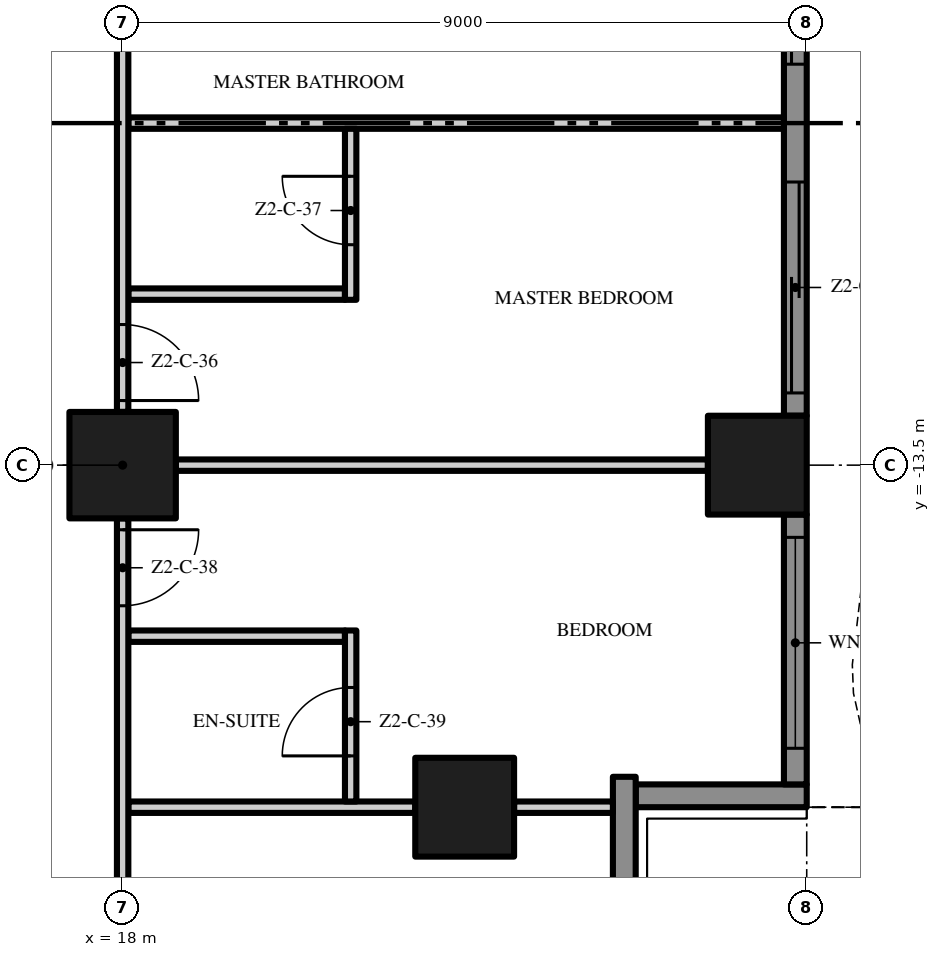
"""IFC4 building model, lengths in metres.
Left out: names, types, materials, properties, quantities, classifications, styles, units other than length and angle.
Written with IfcOpenShell. Run it as: python <this file> out.ifc"""

import sys

from ifc_helpers import new_model, si_unit, direction, frame, frame_2d, origin, origin_2d, place, context, subcontext, project, spatial, polyline, rectangle, outline, extrude, element, fill, save


model = new_model("IFC4")
c1 = context("Model", 3, precision=1e-05, world=origin(), true_north=direction((0.0, 1.0)))
c2 = subcontext(c1, "Body", "Model", "MODEL_VIEW")
j1 = project(units=[si_unit("LENGTHUNIT", "METRE"), si_unit("PLANEANGLEUNIT", "RADIAN")], contexts=[c1])
p1 = place(None, origin())
s1 = spatial("IfcSite", under=j1, at=p1, CompositionType="ELEMENT")
p2 = place(p1, origin())
s2 = spatial("IfcBuilding", under=s1, at=p2, CompositionType="ELEMENT")
p3 = place(p2, frame((0.0, 0.0, 96.0)))
s3 = spatial("IfcBuildingStorey", under=s2, at=p3, CompositionType="ELEMENT", Elevation=96.0)
p4 = place(p3, frame((18.0, -13.5, 0.0), z_axis=(0.0, 0.0, 1.0), x_axis=(1.0, 0.0, 0.0)))
e1 = element("IfcColumn", 1, at=p4, inside=s3, PredefinedType="COLUMN", context=c2, shape_type="SweptSolid", body=[
    extrude(rectangle(XDim=1.4, YDim=1.4, at=origin_2d()), origin(), (0.0, 0.0, 1.0), 3.5),
])
for number, where, z_axis, x_axis in (
    (2, (26.35, -13.5, 0.0), (0.0, 0.0, 1.0), (1.0, 0.0, 0.0)),
    (3, (22.5, -18.0, 0.0), (0.0, 0.0, 1.0), (1.0, 0.0, 0.0)),
):
    element("IfcColumn", number, at=place(p3, frame(where, z_axis=z_axis, x_axis=x_axis)), inside=s3, PredefinedType="COLUMN", context=c2, shape_type="SweptSolid", body=[
        extrude(rectangle(XDim=1.3, YDim=1.3, at=origin_2d()), origin(), (0.0, 0.0, 1.0), 3.5),
    ])
p5 = place(p3, frame((24.6, -17.6, 0.0), z_axis=(0.0, 0.0, 1.0), x_axis=(0.0, -1.0, 0.0)))
e4 = element("IfcWall", 4, at=p5, inside=s3, PredefinedType="SOLIDWALL", context=c2, shape_type="SweptSolid", body=[
    extrude(rectangle(XDim=2.35, YDim=0.3, at=frame_2d((1.175, 0.0))), origin(), (0.0, 0.0, 1.0), 3.5),
])
p6 = place(p3, frame((27.0, -17.85, 0.0), z_axis=(0.0, 0.0, 1.0), x_axis=(-1.0, 0.0, 0.0)))
e5 = element("IfcWall", 5, at=p6, inside=s3, PredefinedType="SOLIDWALL", context=c2, shape_type="SweptSolid", body=[
    extrude(rectangle(XDim=2.25, YDim=0.3, at=frame_2d((1.125, 0.0))), origin(), (0.0, 0.0, 1.0), 3.5),
])
p7 = place(p3, frame((26.85, -14.15, 0.0), z_axis=(0.0, 0.0, 1.0), x_axis=(0.0, -1.0, 0.0)))
e6 = element("IfcWall", 6, at=p7, inside=s3, PredefinedType="SOLIDWALL", context=c2, shape_type="SweptSolid", body=[
    extrude(rectangle(XDim=3.55, YDim=0.3, at=frame_2d((1.775, 0.0))), origin(), (0.0, 0.0, 1.0), 3.5),
])
p8 = place(p7, frame((0.3, 0.0, 0.45)))
e7 = element("IfcOpeningElement", 7, at=p8, cuts=e6, PredefinedType="OPENING", context=c2, shape_type="SweptSolid", body=[
    extrude(rectangle(XDim=2.775, YDim=2.65, at=frame_2d((1.387, 1.325))), frame((0.0, 0.16, 0.0), z_axis=(0.0, -1.0, 0.0), x_axis=(1.0, 0.0, 0.0)), (0.0, 0.0, 1.0), 0.32),
])
p9 = place(p3, frame((26.85, -5.15, 0.0), z_axis=(0.0, 0.0, 1.0), x_axis=(0.0, -1.0, 0.0)))
e8 = element("IfcWall", 8, at=p9, inside=s3, PredefinedType="SOLIDWALL", context=c2, shape_type="SweptSolid", body=[
    extrude(rectangle(XDim=7.7, YDim=0.3, at=frame_2d((3.85, 0.0))), origin(), (0.0, 0.0, 1.0), 3.5),
])
p10 = place(p9, frame((4.625, 0.0, 0.0)))
e9 = element("IfcOpeningElement", 9, at=p10, cuts=e8, PredefinedType="OPENING", context=c2, shape_type="SweptSolid", body=[
    extrude(rectangle(XDim=2.775, YDim=2.4, at=frame_2d((1.387, 1.2))), frame((0.0, 0.16, 0.0), z_axis=(0.0, -1.0, 0.0), x_axis=(1.0, 0.0, 0.0)), (0.0, 0.0, 1.0), 0.32),
])
p11 = place(p9, frame((0.3, 0.0, 0.0)))
e10 = element("IfcOpeningElement", 10, at=p11, cuts=e8, PredefinedType="OPENING", context=c2, shape_type="SweptSolid", body=[
    extrude(rectangle(XDim=2.775, YDim=2.4, at=frame_2d((1.387, 1.2))), frame((0.0, 0.16, 0.0), z_axis=(0.0, -1.0, 0.0), x_axis=(1.0, 0.0, 0.0)), (0.0, 0.0, 1.0), 0.32),
])
p12 = place(p3, origin())
e11 = element("IfcWall", 11, at=p12, inside=s3, PredefinedType="USERDEFINED", context=c2, shape_type="SweptSolid", body=[
    extrude(outline(polyline([(27.951, -18.0), (27.615, -16.5), (27.6, -16.125), (27.731, -15.0), (28.255, -13.5), (28.988, -12.0), (29.649, -10.5), (29.985, -9.0), (30.0, -8.625), (29.869, -7.5), (29.345, -6.0), (28.612, -4.5), (27.951, -3.0), (27.615, -1.5), (27.6, -1.125), (27.731, 0.0), (28.255, 1.5), (28.988, 3.0), (29.649, 4.5), (29.985, 6.0), (30.0, 6.375), (29.869, 7.5), (29.345, 9.0), (28.612, 10.5), (27.951, 12.0), (27.615, 13.5), (27.6, 13.875), (27.731, 15.0), (28.255, 16.5), (28.988, 18.0), (28.763, 18.11), (28.024, 16.596), (27.486, 15.056), (27.349, 13.885), (27.366, 13.467), (27.713, 11.921), (28.385, 10.395), (29.114, 8.904), (29.624, 7.444), (29.749, 6.365), (29.736, 6.033), (29.41, 4.579), (28.761, 3.105), (28.024, 1.596), (27.486, 0.056), (27.349, -1.115), (27.366, -1.533), (27.713, -3.079), (28.385, -4.605), (29.114, -6.096), (29.624, -7.556), (29.749, -8.635), (29.736, -8.967), (29.41, -10.421), (28.761, -11.895), (28.024, -13.404), (27.486, -14.944), (27.349, -16.115), (27.366, -16.533), (27.708, -18.055), (27.951, -18.0)])), origin(), (0.0, 0.0, 1.0), 0.9),
])
p13 = place(p3, frame((18.075, -18.0, 0.0), z_axis=(0.0, 0.0, 1.0), x_axis=(1.0, 0.0, 0.0)))
e12 = element("IfcWall", 12, at=p13, inside=s3, PredefinedType="PARTITIONING", context=c2, shape_type="SweptSolid", body=[
    extrude(rectangle(XDim=3.775, YDim=0.15, at=frame_2d((1.887, 0.0))), origin(), (0.0, 0.0, 1.0), 3.5),
])
p14 = place(p3, frame((23.15, -18.0, 0.0), z_axis=(0.0, 0.0, 1.0), x_axis=(1.0, 0.0, 0.0)))
e13 = element("IfcWall", 13, at=p14, inside=s3, PredefinedType="PARTITIONING", context=c2, shape_type="SweptSolid", body=[
    extrude(rectangle(XDim=1.3, YDim=0.15, at=frame_2d((0.65, 0.0))), origin(), (0.0, 0.0, 1.0), 3.5),
])
p15 = place(p3, frame((18.075, -15.75, 0.0), z_axis=(0.0, 0.0, 1.0), x_axis=(1.0, 0.0, 0.0)))
e14 = element("IfcWall", 14, at=p15, inside=s3, PredefinedType="PARTITIONING", context=c2, shape_type="SweptSolid", body=[
    extrude(rectangle(XDim=2.85, YDim=0.15, at=frame_2d((1.425, 0.0))), origin(), (0.0, 0.0, 1.0), 3.5),
])
p16 = place(p3, frame((18.7, -13.5, 0.0), z_axis=(0.0, 0.0, 1.0), x_axis=(1.0, 0.0, 0.0)))
e15 = element("IfcWall", 15, at=p16, inside=s3, PredefinedType="PARTITIONING", context=c2, shape_type="SweptSolid", body=[
    extrude(rectangle(XDim=7.0, YDim=0.15, at=frame_2d((3.5, 0.0))), origin(), (0.0, 0.0, 1.0), 3.5),
])
p17 = place(p3, frame((18.075, -11.25, 0.0), z_axis=(0.0, 0.0, 1.0), x_axis=(1.0, 0.0, 0.0)))
e16 = element("IfcWall", 16, at=p17, inside=s3, PredefinedType="PARTITIONING", context=c2, shape_type="SweptSolid", body=[
    extrude(rectangle(XDim=2.85, YDim=0.15, at=frame_2d((1.425, 0.0))), origin(), (0.0, 0.0, 1.0), 3.5),
])
p18 = place(p3, frame((18.075, -9.0, 0.0), z_axis=(0.0, 0.0, 1.0), x_axis=(1.0, 0.0, 0.0)))
e17 = element("IfcWall", 17, at=p18, inside=s3, PredefinedType="PARTITIONING", context=c2, shape_type="SweptSolid", body=[
    extrude(rectangle(XDim=8.625, YDim=0.15, at=frame_2d((4.312, 0.0))), origin(), (0.0, 0.0, 1.0), 3.5),
])
p19 = place(p3, frame((18.0, -14.2, 0.0), z_axis=(0.0, 0.0, 1.0), x_axis=(0.0, -1.0, 0.0)))
e18 = element("IfcWall", 18, at=p19, inside=s3, PredefinedType="PARTITIONING", context=c2, shape_type="SweptSolid", body=[
    extrude(rectangle(XDim=7.0, YDim=0.15, at=frame_2d((3.5, 0.0))), origin(), (0.0, 0.0, 1.0), 3.5),
])
p20 = place(p19, frame((0.15, 0.0, 0.0)))
e19 = element("IfcOpeningElement", 19, at=p20, cuts=e18, PredefinedType="OPENING", context=c2, shape_type="SweptSolid", body=[
    extrude(rectangle(XDim=1.0, YDim=2.4, at=frame_2d((0.5, 1.2))), frame((0.0, 0.085, 0.0), z_axis=(0.0, -1.0, 0.0), x_axis=(1.0, 0.0, 0.0)), (0.0, 0.0, 1.0), 0.17),
])
p21 = place(p19, frame((5.55, 0.0, 0.0)))
e20 = element("IfcOpeningElement", 20, at=p21, cuts=e18, PredefinedType="OPENING", context=c2, shape_type="SweptSolid", body=[
    extrude(rectangle(XDim=1.0, YDim=2.4, at=frame_2d((0.5, 1.2))), frame((0.0, 0.085, 0.0), z_axis=(0.0, -1.0, 0.0), x_axis=(1.0, 0.0, 0.0)), (0.0, 0.0, 1.0), 0.17),
])
p22 = place(p3, frame((18.0, -5.2, 0.0), z_axis=(0.0, 0.0, 1.0), x_axis=(0.0, -1.0, 0.0)))
e21 = element("IfcWall", 21, at=p22, inside=s3, PredefinedType="PARTITIONING", context=c2, shape_type="SweptSolid", body=[
    extrude(rectangle(XDim=7.6, YDim=0.15, at=frame_2d((3.8, 0.0))), origin(), (0.0, 0.0, 1.0), 3.5),
])
p23 = place(p22, frame((0.15, 0.0, 0.0)))
e22 = element("IfcOpeningElement", 22, at=p23, cuts=e21, PredefinedType="OPENING", context=c2, shape_type="SweptSolid", body=[
    extrude(rectangle(XDim=1.8, YDim=2.4, at=frame_2d((0.9, 1.2))), frame((0.0, 0.085, 0.0), z_axis=(0.0, -1.0, 0.0), x_axis=(1.0, 0.0, 0.0)), (0.0, 0.0, 1.0), 0.17),
])
p24 = place(p22, frame((6.45, 0.0, 0.0)))
e23 = element("IfcOpeningElement", 23, at=p24, cuts=e21, PredefinedType="OPENING", context=c2, shape_type="SweptSolid", body=[
    extrude(rectangle(XDim=1.0, YDim=2.4, at=frame_2d((0.5, 1.2))), frame((0.0, 0.085, 0.0), z_axis=(0.0, -1.0, 0.0), x_axis=(1.0, 0.0, 0.0)), (0.0, 0.0, 1.0), 0.17),
])
p25 = place(p3, frame((21.0, -17.925, 0.0), z_axis=(0.0, 0.0, 1.0), x_axis=(0.0, 1.0, 0.0)))
e24 = element("IfcWall", 24, at=p25, inside=s3, PredefinedType="PARTITIONING", context=c2, shape_type="SweptSolid", body=[
    extrude(rectangle(XDim=2.25, YDim=0.15, at=frame_2d((1.125, 0.0))), origin(), (0.0, 0.0, 1.0), 3.5),
])
p26 = place(p25, frame((0.6, 0.0, 0.0)))
e25 = element("IfcOpeningElement", 25, at=p26, cuts=e24, PredefinedType="OPENING", context=c2, shape_type="SweptSolid", body=[
    extrude(rectangle(XDim=0.9, YDim=2.1, at=frame_2d((0.45, 1.05))), frame((0.0, 0.085, 0.0), z_axis=(0.0, -1.0, 0.0), x_axis=(1.0, 0.0, 0.0)), (0.0, 0.0, 1.0), 0.17),
])
p27 = place(p3, frame((21.0, -11.325, 0.0), z_axis=(0.0, 0.0, 1.0), x_axis=(0.0, 1.0, 0.0)))
e26 = element("IfcWall", 26, at=p27, inside=s3, PredefinedType="PARTITIONING", context=c2, shape_type="SweptSolid", body=[
    extrude(rectangle(XDim=2.25, YDim=0.15, at=frame_2d((1.125, 0.0))), origin(), (0.0, 0.0, 1.0), 3.5),
])
p28 = place(p27, frame((0.725, 0.0, 0.0)))
e27 = element("IfcOpeningElement", 27, at=p28, cuts=e26, PredefinedType="OPENING", context=c2, shape_type="SweptSolid", body=[
    extrude(rectangle(XDim=0.9, YDim=2.1, at=frame_2d((0.45, 1.05))), frame((0.0, 0.085, 0.0), z_axis=(0.0, -1.0, 0.0), x_axis=(1.0, 0.0, 0.0)), (0.0, 0.0, 1.0), 0.17),
])
p29 = place(p8, origin())
e28 = element("IfcWindow", 28, at=p29, inside=s3, PartitioningType="SINGLE_PANEL", PredefinedType="WINDOW", context=c2, shape_type="SweptSolid", body=[
    extrude(rectangle(XDim=2.775, YDim=2.65, at=frame_2d((1.387, 1.325))), frame((0.0, 0.03, 0.0), z_axis=(0.0, -1.0, 0.0), x_axis=(1.0, 0.0, 0.0)), (0.0, 0.0, 1.0), 0.06),
])
fill(e7, e28)
p30 = place(p10, origin())
e29 = element("IfcDoor", 29, at=p30, inside=s3, OperationType="SINGLE_SWING_LEFT", PredefinedType="DOOR", context=c2, shape_type="SweptSolid", body=[
    extrude(rectangle(XDim=2.775, YDim=2.4, at=frame_2d((1.387, 1.2))), frame((0.0, 0.025, 0.0), z_axis=(0.0, -1.0, 0.0), x_axis=(1.0, 0.0, 0.0)), (0.0, 0.0, 1.0), 0.05),
])
fill(e9, e29)
p31 = place(p11, origin())
e30 = element("IfcDoor", 30, at=p31, inside=s3, OperationType="SINGLE_SWING_LEFT", PredefinedType="DOOR", context=c2, shape_type="SweptSolid", body=[
    extrude(rectangle(XDim=2.775, YDim=2.4, at=frame_2d((1.387, 1.2))), frame((0.0, 0.025, 0.0), z_axis=(0.0, -1.0, 0.0), x_axis=(1.0, 0.0, 0.0)), (0.0, 0.0, 1.0), 0.05),
])
fill(e10, e30)
p32 = place(p24, origin())
e31 = element("IfcDoor", 31, at=p32, inside=s3, OperationType="SINGLE_SWING_RIGHT", PredefinedType="DOOR", context=c2, shape_type="SweptSolid", body=[
    extrude(rectangle(XDim=1.0, YDim=2.4, at=frame_2d((0.5, 1.2))), frame((0.0, 0.025, 0.0), z_axis=(0.0, -1.0, 0.0), x_axis=(1.0, 0.0, 0.0)), (0.0, 0.0, 1.0), 0.05),
])
fill(e23, e31)
p33 = place(p28, origin())
e32 = element("IfcDoor", 32, at=p33, inside=s3, OperationType="SINGLE_SWING_RIGHT", PredefinedType="DOOR", context=c2, shape_type="SweptSolid", body=[
    extrude(rectangle(XDim=0.9, YDim=2.1, at=frame_2d((0.45, 1.05))), frame((0.0, 0.025, 0.0), z_axis=(0.0, -1.0, 0.0), x_axis=(1.0, 0.0, 0.0)), (0.0, 0.0, 1.0), 0.05),
])
fill(e27, e32)
p34 = place(p20, origin())
e33 = element("IfcDoor", 33, at=p34, inside=s3, OperationType="SINGLE_SWING_LEFT", PredefinedType="DOOR", context=c2, shape_type="SweptSolid", body=[
    extrude(rectangle(XDim=1.0, YDim=2.4, at=frame_2d((0.5, 1.2))), frame((0.0, 0.025, 0.0), z_axis=(0.0, -1.0, 0.0), x_axis=(1.0, 0.0, 0.0)), (0.0, 0.0, 1.0), 0.05),
])
fill(e19, e33)
p35 = place(p26, origin())
e34 = element("IfcDoor", 34, at=p35, inside=s3, OperationType="SINGLE_SWING_LEFT", PredefinedType="DOOR", context=c2, shape_type="SweptSolid", body=[
    extrude(rectangle(XDim=0.9, YDim=2.1, at=frame_2d((0.45, 1.05))), frame((0.0, 0.025, 0.0), z_axis=(0.0, -1.0, 0.0), x_axis=(1.0, 0.0, 0.0)), (0.0, 0.0, 1.0), 0.05),
])
fill(e25, e34)
save(model, sys.argv[1])
